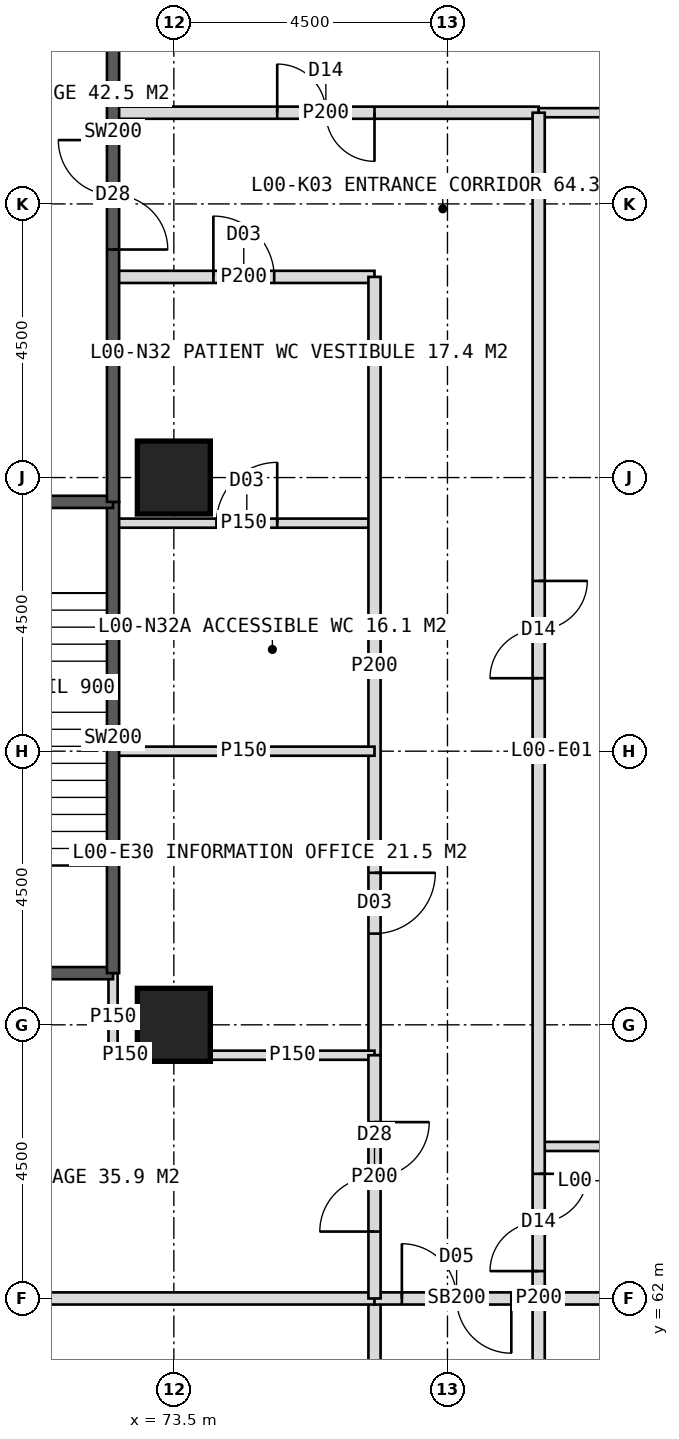
"""IFC4 building model, lengths in metres.
Left out: names, types, materials, properties, quantities, classifications, styles, units other than length and angle.
Written with IfcOpenShell. Run it as: python <this file> out.ifc"""

import sys

from ifc_helpers import new_model, si_unit, direction, frame, frame_2d, origin, origin_2d, place, context, subcontext, project, spatial, rectangle, hollow_rectangle, extrude, element, fill, save


model = new_model("IFC4")
c1 = context("Model", 3, precision=1e-05, world=origin(), true_north=direction((0.0, 1.0)))
c2 = subcontext(c1, "Body", "Model", "MODEL_VIEW")
j1 = project(units=[si_unit("LENGTHUNIT", "METRE"), si_unit("PLANEANGLEUNIT", "RADIAN")], contexts=[c1])
p1 = place(None, origin())
s1 = spatial("IfcSite", under=j1, at=p1, CompositionType="ELEMENT")
p2 = place(p1, origin())
s2 = spatial("IfcBuilding", under=s1, at=p2, CompositionType="ELEMENT")
p3 = place(p2, origin())
s3 = spatial("IfcBuildingStorey", under=s2, at=p3, CompositionType="ELEMENT", Elevation=0.0)
for number, where, z_axis, x_axis in (
    (1, (73.5, 75.5, 0.0), (0.0, 0.0, 1.0), (1.0, 0.0, 0.0)),
    (2, (73.5, 66.5, 0.0), (0.0, 0.0, 1.0), (1.0, 0.0, 0.0)),
):
    element("IfcColumn", number, at=place(p3, frame(where, z_axis=z_axis, x_axis=x_axis)), inside=s3, PredefinedType="COLUMN", context=c2, shape_type="SweptSolid", body=[
        extrude(hollow_rectangle(XDim=1.2, YDim=1.2, WallThickness=0.1, at=origin_2d()), origin(), (0.0, 0.0, 1.0), 6.0),
    ])
p4 = place(p3, frame((72.5, 81.5, 0.0), z_axis=(0.0, 0.0, 1.0), x_axis=(1.0, 0.0, 0.0)))
e3 = element("IfcWall", 3, at=p4, inside=s3, PredefinedType="PARTITIONING", context=c2, shape_type="SweptSolid", body=[
    extrude(rectangle(XDim=7.0, YDim=0.2, at=frame_2d((3.5, 0.0))), origin(), (0.0, 0.0, 1.0), 5.7),
])
p5 = place(p4, frame((2.7, 0.0, 0.0)))
e4 = element("IfcOpeningElement", 4, at=p5, cuts=e3, PredefinedType="OPENING", context=c2, shape_type="SweptSolid", body=[
    extrude(rectangle(XDim=1.6, YDim=2.2, at=frame_2d((0.8, 1.1))), frame((0.0, 0.11, 0.0), z_axis=(0.0, -1.0, 0.0), x_axis=(1.0, 0.0, 0.0)), (0.0, 0.0, 1.0), 0.22),
])
p6 = place(p3, frame((72.5, 78.8, 0.0), z_axis=(0.0, 0.0, 1.0), x_axis=(1.0, 0.0, 0.0)))
e5 = element("IfcWall", 5, at=p6, inside=s3, PredefinedType="PARTITIONING", context=c2, shape_type="SweptSolid", body=[
    extrude(rectangle(XDim=4.3, YDim=0.2, at=frame_2d((2.15, 0.0))), origin(), (0.0, 0.0, 1.0), 5.7),
])
p7 = place(p6, frame((1.65, 0.0, 0.0)))
e6 = element("IfcOpeningElement", 6, at=p7, cuts=e5, PredefinedType="OPENING", context=c2, shape_type="SweptSolid", body=[
    extrude(rectangle(XDim=1.0, YDim=2.1, at=frame_2d((0.5, 1.05))), frame((0.0, 0.11, 0.0), z_axis=(0.0, -1.0, 0.0), x_axis=(1.0, 0.0, 0.0)), (0.0, 0.0, 1.0), 0.22),
])
p8 = place(p3, frame((72.5, 74.75, 0.0), z_axis=(0.0, 0.0, 1.0), x_axis=(1.0, 0.0, 0.0)))
e7 = element("IfcWall", 7, at=p8, inside=s3, PredefinedType="PARTITIONING", context=c2, shape_type="SweptSolid", body=[
    extrude(rectangle(XDim=4.3, YDim=0.15, at=frame_2d((2.15, 0.0))), origin(), (0.0, 0.0, 1.0), 5.7),
])
p9 = place(p8, frame((1.7, 0.0, 0.0)))
e8 = element("IfcOpeningElement", 8, at=p9, cuts=e7, PredefinedType="OPENING", context=c2, shape_type="SweptSolid", body=[
    extrude(rectangle(XDim=1.0, YDim=2.1, at=frame_2d((0.5, 1.05))), frame((0.0, 0.085, 0.0), z_axis=(0.0, -1.0, 0.0), x_axis=(1.0, 0.0, 0.0)), (0.0, 0.0, 1.0), 0.17),
])
for number, where, z_axis, x_axis in (
    (9, (79.5, 81.5, 0.0), (0.0, 0.0, 1.0), (1.0, 0.0, 0.0)),
    (10, (79.5, 64.5, 0.0), (0.0, 0.0, 1.0), (1.0, 0.0, 0.0)),
):
    element("IfcWall", number, at=place(p3, frame(where, z_axis=z_axis, x_axis=x_axis)), inside=s3, PredefinedType="PARTITIONING", context=c2, shape_type="SweptSolid", body=[
        extrude(rectangle(XDim=6.15, YDim=0.15, at=frame_2d((3.075, 0.0))), origin(), (0.0, 0.0, 1.0), 5.7),
    ])
p10 = place(p3, frame((79.5, 62.0, 0.0), z_axis=(0.0, 0.0, 1.0), x_axis=(1.0, 0.0, 0.0)))
e11 = element("IfcWall", 11, at=p10, inside=s3, PredefinedType="SOLIDWALL", context=c2, shape_type="SweptSolid", body=[
    extrude(rectangle(XDim=5.7, YDim=0.2, at=frame_2d((2.85, 0.0))), origin(), (0.0, 0.0, 1.0), 4.9),
])
p11 = place(p3, frame((79.5, 81.5, 0.0), z_axis=(0.0, 0.0, 1.0), x_axis=(0.0, -1.0, 0.0)))
e12 = element("IfcWall", 12, at=p11, inside=s3, PredefinedType="PARTITIONING", context=c2, shape_type="SweptSolid", body=[
    extrude(rectangle(XDim=39.0, YDim=0.2, at=frame_2d((19.5, 0.0))), origin(), (0.0, 0.0, 1.0), 5.7),
])
p12 = place(p11, frame((7.7, 0.0, 0.0)))
e13 = element("IfcOpeningElement", 13, at=p12, cuts=e12, PredefinedType="OPENING", context=c2, shape_type="SweptSolid", body=[
    extrude(rectangle(XDim=1.6, YDim=2.2, at=frame_2d((0.8, 1.1))), frame((0.0, 0.11, 0.0), z_axis=(0.0, -1.0, 0.0), x_axis=(1.0, 0.0, 0.0)), (0.0, 0.0, 1.0), 0.22),
])
p13 = place(p11, frame((17.45, 0.0, 0.0)))
e14 = element("IfcOpeningElement", 14, at=p13, cuts=e12, PredefinedType="OPENING", context=c2, shape_type="SweptSolid", body=[
    extrude(rectangle(XDim=1.6, YDim=2.2, at=frame_2d((0.8, 1.1))), frame((0.0, 0.11, 0.0), z_axis=(0.0, -1.0, 0.0), x_axis=(1.0, 0.0, 0.0)), (0.0, 0.0, 1.0), 0.22),
])
p14 = place(p11, frame((27.0, 0.0, 0.0)))
e15 = element("IfcOpeningElement", 15, at=p14, cuts=e12, PredefinedType="OPENING", context=c2, shape_type="SweptSolid", body=[
    extrude(rectangle(XDim=1.6, YDim=2.2, at=frame_2d((0.8, 1.1))), frame((0.0, 0.11, 0.0), z_axis=(0.0, -1.0, 0.0), x_axis=(1.0, 0.0, 0.0)), (0.0, 0.0, 1.0), 0.22),
])
p15 = place(p11, frame((36.75, 0.0, 0.0)))
e16 = element("IfcOpeningElement", 16, at=p15, cuts=e12, PredefinedType="OPENING", context=c2, shape_type="SweptSolid", body=[
    extrude(rectangle(XDim=1.6, YDim=2.2, at=frame_2d((0.8, 1.1))), frame((0.0, 0.11, 0.0), z_axis=(0.0, -1.0, 0.0), x_axis=(1.0, 0.0, 0.0)), (0.0, 0.0, 1.0), 0.22),
])
p16 = place(p3, frame((76.8, 78.8, 0.0), z_axis=(0.0, 0.0, 1.0), x_axis=(0.0, -1.0, 0.0)))
e17 = element("IfcWall", 17, at=p16, inside=s3, PredefinedType="PARTITIONING", context=c2, shape_type="SweptSolid", body=[
    extrude(rectangle(XDim=12.8, YDim=0.2, at=frame_2d((6.4, 0.0))), origin(), (0.0, 0.0, 1.0), 5.7),
])
p17 = place(p16, frame((9.8, 0.0, 0.0)))
e18 = element("IfcOpeningElement", 18, at=p17, cuts=e17, PredefinedType="OPENING", context=c2, shape_type="SweptSolid", body=[
    extrude(rectangle(XDim=1.0, YDim=2.1, at=frame_2d((0.5, 1.05))), frame((0.0, 0.11, 0.0), z_axis=(0.0, -1.0, 0.0), x_axis=(1.0, 0.0, 0.0)), (0.0, 0.0, 1.0), 0.22),
])
p18 = place(p3, frame((76.8, 62.0, 0.0), z_axis=(0.0, 0.0, 1.0), x_axis=(0.0, -1.0, 0.0)))
e19 = element("IfcWall", 19, at=p18, inside=s3, PredefinedType="PARTITIONING", context=c2, shape_type="SweptSolid", body=[
    extrude(rectangle(XDim=16.8, YDim=0.2, at=frame_2d((8.4, 0.0))), origin(), (0.0, 0.0, 1.0), 5.7),
])
p19 = place(p18, frame((12.4, 0.0, 0.0)))
e20 = element("IfcOpeningElement", 20, at=p19, cuts=e19, PredefinedType="OPENING", context=c2, shape_type="SweptSolid", body=[
    extrude(rectangle(XDim=1.0, YDim=2.1, at=frame_2d((0.5, 1.05))), frame((0.0, 0.11, 0.0), z_axis=(0.0, -1.0, 0.0), x_axis=(1.0, 0.0, 0.0)), (0.0, 0.0, 1.0), 0.22),
])
p20 = place(p18, frame((7.35, 0.0, 0.0)))
e21 = element("IfcOpeningElement", 21, at=p20, cuts=e19, PredefinedType="OPENING", context=c2, shape_type="SweptSolid", body=[
    extrude(rectangle(XDim=0.9, YDim=2.1, at=frame_2d((0.45, 1.05))), frame((0.0, 0.11, 0.0), z_axis=(0.0, -1.0, 0.0), x_axis=(1.0, 0.0, 0.0)), (0.0, 0.0, 1.0), 0.22),
])
p21 = place(p18, frame((2.8, 0.0, 0.0)))
e22 = element("IfcOpeningElement", 22, at=p21, cuts=e19, PredefinedType="OPENING", context=c2, shape_type="SweptSolid", body=[
    extrude(rectangle(XDim=1.0, YDim=2.1, at=frame_2d((0.5, 1.05))), frame((0.0, 0.11, 0.0), z_axis=(0.0, -1.0, 0.0), x_axis=(1.0, 0.0, 0.0)), (0.0, 0.0, 1.0), 0.22),
])
p22 = place(p3, frame((72.5, 71.0, 0.0), z_axis=(0.0, 0.0, 1.0), x_axis=(1.0, 0.0, 0.0)))
e23 = element("IfcWall", 23, at=p22, inside=s3, PredefinedType="PARTITIONING", context=c2, shape_type="SweptSolid", body=[
    extrude(rectangle(XDim=4.3, YDim=0.15, at=frame_2d((2.15, 0.0))), origin(), (0.0, 0.0, 1.0), 5.7),
])
p23 = place(p3, frame((72.5, 66.0, 0.0), z_axis=(0.0, 0.0, 1.0), x_axis=(1.0, 0.0, 0.0)))
e24 = element("IfcWall", 24, at=p23, inside=s3, PredefinedType="PARTITIONING", context=c2, shape_type="SweptSolid", body=[
    extrude(rectangle(XDim=0.4, YDim=0.15, at=frame_2d((0.2, 0.0))), origin(), (0.0, 0.0, 1.0), 5.7),
])
p24 = place(p3, frame((74.1, 66.0, 0.0), z_axis=(0.0, 0.0, 1.0), x_axis=(1.0, 0.0, 0.0)))
e25 = element("IfcWall", 25, at=p24, inside=s3, PredefinedType="PARTITIONING", context=c2, shape_type="SweptSolid", body=[
    extrude(rectangle(XDim=2.7, YDim=0.15, at=frame_2d((1.35, 0.0))), origin(), (0.0, 0.0, 1.0), 5.7),
])
p25 = place(p3, frame((69.0, 62.0, 0.0), z_axis=(0.0, 0.0, 1.0), x_axis=(1.0, 0.0, 0.0)))
e26 = element("IfcWall", 26, at=p25, inside=s3, PredefinedType="SOLIDWALL", context=c2, shape_type="SweptSolid", body=[
    extrude(rectangle(XDim=7.8, YDim=0.2, at=frame_2d((3.9, 0.0))), origin(), (0.0, 0.0, 1.0), 4.9),
])
p26 = place(p3, frame((76.8, 62.0, 0.0), z_axis=(0.0, 0.0, 1.0), x_axis=(1.0, 0.0, 0.0)))
e27 = element("IfcWall", 27, at=p26, inside=s3, PredefinedType="SOLIDWALL", context=c2, shape_type="SweptSolid", body=[
    extrude(rectangle(XDim=2.7, YDim=0.2, at=frame_2d((1.35, 0.0))), origin(), (0.0, 0.0, 1.0), 4.9),
])
p27 = place(p26, frame((0.45, 0.0, 0.0)))
e28 = element("IfcOpeningElement", 28, at=p27, cuts=e27, PredefinedType="OPENING", context=c2, shape_type="SweptSolid", body=[
    extrude(rectangle(XDim=1.8, YDim=2.2, at=frame_2d((0.9, 1.1))), frame((0.0, 0.11, 0.0), z_axis=(0.0, -1.0, 0.0), x_axis=(1.0, 0.0, 0.0)), (0.0, 0.0, 1.0), 0.22),
])
p28 = place(p3, frame((72.5, 65.9, 0.0), z_axis=(0.0, 0.0, 1.0), x_axis=(0.0, 1.0, 0.0)))
e29 = element("IfcWall", 29, at=p28, inside=s3, PredefinedType="PARTITIONING", context=c2, shape_type="SweptSolid", body=[
    extrude(rectangle(XDim=1.45, YDim=0.15, at=frame_2d((0.725, 0.0))), origin(), (0.0, 0.0, 1.0), 5.7),
])
p29 = place(p3, frame((69.0, 67.35, 0.0), z_axis=(0.0, 0.0, 1.0), x_axis=(1.0, 0.0, 0.0)))
e30 = element("IfcWall", 30, at=p29, inside=s3, PredefinedType="SOLIDWALL", context=c2, shape_type="SweptSolid", body=[
    extrude(rectangle(XDim=3.5, YDim=0.2, at=frame_2d((1.75, 0.0))), origin(), (0.0, 0.0, 1.0), 5.7),
])
p30 = place(p3, frame((72.5, 67.35, 0.0), z_axis=(0.0, 0.0, 1.0), x_axis=(0.0, 1.0, 0.0)))
e31 = element("IfcWall", 31, at=p30, inside=s3, PredefinedType="SOLIDWALL", context=c2, shape_type="SweptSolid", body=[
    extrude(rectangle(XDim=7.75, YDim=0.2, at=frame_2d((3.875, 0.0))), origin(), (0.0, 0.0, 1.0), 5.7),
])
p31 = place(p3, frame((69.0, 75.1, 0.0), z_axis=(0.0, 0.0, 1.0), x_axis=(1.0, 0.0, 0.0)))
e32 = element("IfcWall", 32, at=p31, inside=s3, PredefinedType="SOLIDWALL", context=c2, shape_type="SweptSolid", body=[
    extrude(rectangle(XDim=3.5, YDim=0.2, at=frame_2d((1.75, 0.0))), origin(), (0.0, 0.0, 1.0), 5.7),
])
p32 = place(p31, frame((1.15, 0.0, 0.0)))
e33 = element("IfcOpeningElement", 33, at=p32, cuts=e32, PredefinedType="OPENING", context=c2, shape_type="SweptSolid", body=[
    extrude(rectangle(XDim=1.2, YDim=2.1, at=frame_2d((0.6, 1.05))), frame((0.0, 0.11, 0.0), z_axis=(0.0, -1.0, 0.0), x_axis=(1.0, 0.0, 0.0)), (0.0, 0.0, 1.0), 0.22),
])
p33 = place(p3, frame((72.5, 75.1, 0.0), z_axis=(0.0, 0.0, 1.0), x_axis=(0.0, 1.0, 0.0)))
e34 = element("IfcWall", 34, at=p33, inside=s3, PredefinedType="SOLIDWALL", context=c2, shape_type="SweptSolid", body=[
    extrude(rectangle(XDim=12.15, YDim=0.2, at=frame_2d((6.075, 0.0))), origin(), (0.0, 0.0, 1.0), 5.7),
])
p34 = place(p33, frame((4.15, 0.0, 0.0)))
e35 = element("IfcOpeningElement", 35, at=p34, cuts=e34, PredefinedType="OPENING", context=c2, shape_type="SweptSolid", body=[
    extrude(rectangle(XDim=1.8, YDim=2.2, at=frame_2d((0.9, 1.1))), frame((0.0, 0.11, 0.0), z_axis=(0.0, -1.0, 0.0), x_axis=(1.0, 0.0, 0.0)), (0.0, 0.0, 1.0), 0.22),
])
p35 = place(p3, frame((76.8, 66.0, 0.0), z_axis=(0.0, 0.0, 1.0), x_axis=(0.0, -1.0, 0.0)))
e36 = element("IfcWall", 36, at=p35, inside=s3, PredefinedType="PARTITIONING", context=c2, shape_type="SweptSolid", body=[
    extrude(rectangle(XDim=4.0, YDim=0.2, at=frame_2d((2.0, 0.0))), origin(), (0.0, 0.0, 1.0), 5.7),
])
p36 = place(p35, frame((1.1, 0.0, 0.0)))
e37 = element("IfcOpeningElement", 37, at=p36, cuts=e36, PredefinedType="OPENING", context=c2, shape_type="SweptSolid", body=[
    extrude(rectangle(XDim=1.8, YDim=2.2, at=frame_2d((0.9, 1.1))), frame((0.0, 0.11, 0.0), z_axis=(0.0, -1.0, 0.0), x_axis=(1.0, 0.0, 0.0)), (0.0, 0.0, 1.0), 0.22),
])
p37 = place(p7, origin())
e38 = element("IfcDoor", 38, at=p37, inside=s3, OperationType="SINGLE_SWING_LEFT", PredefinedType="DOOR", context=c2, shape_type="SweptSolid", body=[
    extrude(rectangle(XDim=1.0, YDim=2.1, at=frame_2d((0.5, 1.05))), frame((0.0, 0.025, 0.0), z_axis=(0.0, -1.0, 0.0), x_axis=(1.0, 0.0, 0.0)), (0.0, 0.0, 1.0), 0.05),
])
fill(e6, e38)
p38 = place(p17, origin())
e39 = element("IfcDoor", 39, at=p38, inside=s3, OperationType="SINGLE_SWING_LEFT", PredefinedType="DOOR", context=c2, shape_type="SweptSolid", body=[
    extrude(rectangle(XDim=1.0, YDim=2.1, at=frame_2d((0.5, 1.05))), frame((0.0, 0.025, 0.0), z_axis=(0.0, -1.0, 0.0), x_axis=(1.0, 0.0, 0.0)), (0.0, 0.0, 1.0), 0.05),
])
fill(e18, e39)
p39 = place(p27, origin())
e40 = element("IfcDoor", 40, at=p39, inside=s3, OperationType="DOUBLE_DOOR_DOUBLE_SWING", PredefinedType="DOOR", context=c2, shape_type="SweptSolid", body=[
    extrude(rectangle(XDim=1.8, YDim=2.2, at=frame_2d((0.9, 1.1))), frame((0.0, 0.025, 0.0), z_axis=(0.0, -1.0, 0.0), x_axis=(1.0, 0.0, 0.0)), (0.0, 0.0, 1.0), 0.05),
])
fill(e28, e40)
p40 = place(p5, origin())
e41 = element("IfcDoor", 41, at=p40, inside=s3, OperationType="DOUBLE_DOOR_DOUBLE_SWING", PredefinedType="DOOR", context=c2, shape_type="SweptSolid", body=[
    extrude(rectangle(XDim=1.6, YDim=2.2, at=frame_2d((0.8, 1.1))), frame((0.0, 0.025, 0.0), z_axis=(0.0, -1.0, 0.0), x_axis=(1.0, 0.0, 0.0)), (0.0, 0.0, 1.0), 0.05),
])
fill(e4, e41)
p41 = place(p9, origin())
e42 = element("IfcDoor", 42, at=p41, inside=s3, OperationType="SINGLE_SWING_RIGHT", PredefinedType="DOOR", context=c2, shape_type="SweptSolid", body=[
    extrude(rectangle(XDim=1.0, YDim=2.1, at=frame_2d((0.5, 1.05))), frame((0.0, 0.025, 0.0), z_axis=(0.0, -1.0, 0.0), x_axis=(1.0, 0.0, 0.0)), (0.0, 0.0, 1.0), 0.05),
])
fill(e8, e42)
p42 = place(p12, origin())
e43 = element("IfcDoor", 43, at=p42, inside=s3, OperationType="DOUBLE_DOOR_DOUBLE_SWING", PredefinedType="DOOR", context=c2, shape_type="SweptSolid", body=[
    extrude(rectangle(XDim=1.6, YDim=2.2, at=frame_2d((0.8, 1.1))), frame((0.0, 0.025, 0.0), z_axis=(0.0, -1.0, 0.0), x_axis=(1.0, 0.0, 0.0)), (0.0, 0.0, 1.0), 0.05),
])
fill(e13, e43)
p43 = place(p13, origin())
e44 = element("IfcDoor", 44, at=p43, inside=s3, OperationType="DOUBLE_DOOR_DOUBLE_SWING", PredefinedType="DOOR", context=c2, shape_type="SweptSolid", body=[
    extrude(rectangle(XDim=1.6, YDim=2.2, at=frame_2d((0.8, 1.1))), frame((0.0, 0.025, 0.0), z_axis=(0.0, -1.0, 0.0), x_axis=(1.0, 0.0, 0.0)), (0.0, 0.0, 1.0), 0.05),
])
fill(e14, e44)
p44 = place(p36, origin())
e45 = element("IfcDoor", 45, at=p44, inside=s3, OperationType="DOUBLE_DOOR_SINGLE_SWING", PredefinedType="DOOR", context=c2, shape_type="SweptSolid", body=[
    extrude(rectangle(XDim=1.8, YDim=2.2, at=frame_2d((0.9, 1.1))), frame((0.0, 0.025, 0.0), z_axis=(0.0, -1.0, 0.0), x_axis=(1.0, 0.0, 0.0)), (0.0, 0.0, 1.0), 0.05),
])
fill(e37, e45)
p45 = place(p34, frame((1.8, 0.0, 0.0), z_axis=(0.0, 0.0, 1.0), x_axis=(-1.0, 0.0, 0.0)))
e46 = element("IfcDoor", 46, at=p45, inside=s3, OperationType="DOUBLE_DOOR_SINGLE_SWING", PredefinedType="DOOR", context=c2, shape_type="SweptSolid", body=[
    extrude(rectangle(XDim=1.8, YDim=2.2, at=frame_2d((0.9, 1.1))), frame((0.0, 0.025, 0.0), z_axis=(0.0, -1.0, 0.0), x_axis=(1.0, 0.0, 0.0)), (0.0, 0.0, 1.0), 0.05),
])
fill(e35, e46)
save(model, sys.argv[1])
